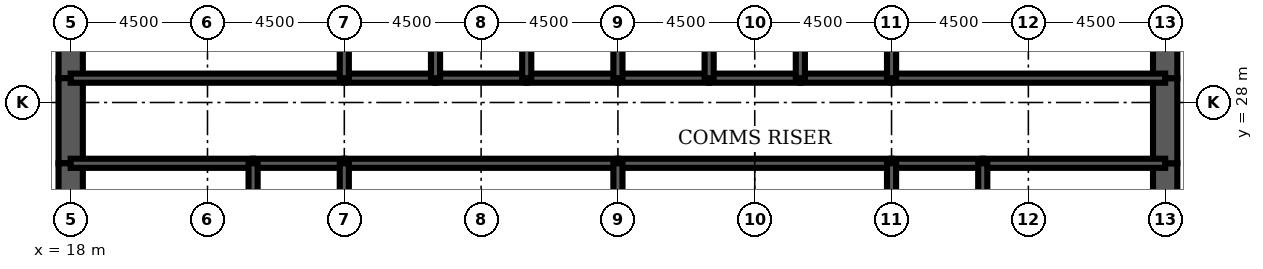
"""IFC4 building model, lengths in metres.
Left out: names, types, materials, properties, quantities, classifications, styles, units other than length and angle.
Written with IfcOpenShell. Run it as: python <this file> out.ifc"""

import sys

from ifc_helpers import new_model, si_unit, direction, frame, frame_2d, origin, place, context, subcontext, project, spatial, rectangle, extrude, element, fill, save


model = new_model("IFC4")
c1 = context("Model", 3, precision=1e-05, world=origin(), true_north=direction((0.0, 1.0)))
c2 = subcontext(c1, "Body", "Model", "MODEL_VIEW")
j1 = project(units=[si_unit("LENGTHUNIT", "METRE"), si_unit("PLANEANGLEUNIT", "RADIAN")], contexts=[c1])
p1 = place(None, origin())
s1 = spatial("IfcSite", under=j1, at=p1, CompositionType="ELEMENT")
p2 = place(p1, origin())
s2 = spatial("IfcBuilding", under=s1, at=p2, CompositionType="ELEMENT")
p3 = place(p2, frame((0.0, 0.0, 240.4)))
s3 = spatial("IfcBuildingStorey", under=s2, at=p3, CompositionType="ELEMENT", Elevation=240.4)
p4 = place(p3, frame((18.0, 32.0, 0.0), z_axis=(0.0, 0.0, 1.0), x_axis=(0.0, -1.0, 0.0)))
e1 = element("IfcWall", 1, at=p4, inside=s3, PredefinedType="SHEAR", context=c2, shape_type="SweptSolid", body=[
    extrude(rectangle(XDim=3.2, YDim=0.8, at=frame_2d((1.6, 0.0))), origin(), (0.0, 0.0, 1.0), 4.2),
])
p5 = place(p3, frame((18.0, 28.8, 0.0), z_axis=(0.0, 0.0, 1.0), x_axis=(0.0, -1.0, 0.0)))
e2 = element("IfcWall", 2, at=p5, inside=s3, PredefinedType="SHEAR", context=c2, shape_type="SweptSolid", body=[
    extrude(rectangle(XDim=2.8, YDim=0.8, at=frame_2d((1.4, 0.0))), origin(), (0.0, 0.0, 1.0), 4.2),
])
p6 = place(p5, frame((0.4, 0.0, 0.0)))
e3 = element("IfcOpeningElement", 3, at=p6, cuts=e2, PredefinedType="OPENING", context=c2, shape_type="SweptSolid", body=[
    extrude(rectangle(XDim=1.8, YDim=2.1, at=frame_2d((0.9, 1.05))), frame((0.0, 0.41, 0.0), z_axis=(0.0, -1.0, 0.0), x_axis=(1.0, 0.0, 0.0)), (0.0, 0.0, 1.0), 0.82),
])
for number, where, z_axis, x_axis in (
    (4, (18.0, 26.0, 0.0), (0.0, 0.0, 1.0), (0.0, -1.0, 0.0)),
    (5, (54.0, 22.0, 0.0), (0.0, 0.0, 1.0), (0.0, 1.0, 0.0)),
):
    element("IfcWall", number, at=place(p3, frame(where, z_axis=z_axis, x_axis=x_axis)), inside=s3, PredefinedType="SHEAR", context=c2, shape_type="SweptSolid", body=[
        extrude(rectangle(XDim=4.0, YDim=0.8, at=frame_2d((2.0, 0.0))), origin(), (0.0, 0.0, 1.0), 4.2),
    ])
p7 = place(p3, frame((54.0, 26.0, 0.0), z_axis=(0.0, 0.0, 1.0), x_axis=(0.0, 1.0, 0.0)))
e6 = element("IfcWall", 6, at=p7, inside=s3, PredefinedType="SHEAR", context=c2, shape_type="SweptSolid", body=[
    extrude(rectangle(XDim=2.8, YDim=0.8, at=frame_2d((1.4, 0.0))), origin(), (0.0, 0.0, 1.0), 4.2),
])
p8 = place(p7, frame((0.6, 0.0, 0.0)))
e7 = element("IfcOpeningElement", 7, at=p8, cuts=e6, PredefinedType="OPENING", context=c2, shape_type="SweptSolid", body=[
    extrude(rectangle(XDim=1.8, YDim=2.1, at=frame_2d((0.9, 1.05))), frame((0.0, 0.41, 0.0), z_axis=(0.0, -1.0, 0.0), x_axis=(1.0, 0.0, 0.0)), (0.0, 0.0, 1.0), 0.82),
])
p9 = place(p3, frame((54.0, 28.8, 0.0), z_axis=(0.0, 0.0, 1.0), x_axis=(0.0, 1.0, 0.0)))
e8 = element("IfcWall", 8, at=p9, inside=s3, PredefinedType="SHEAR", context=c2, shape_type="SweptSolid", body=[
    extrude(rectangle(XDim=3.2, YDim=0.8, at=frame_2d((1.6, 0.0))), origin(), (0.0, 0.0, 1.0), 4.2),
])
p10 = place(p3, frame((18.0, 28.8, 0.0), z_axis=(0.0, 0.0, 1.0), x_axis=(1.0, 0.0, 0.0)))
e9 = element("IfcWall", 9, at=p10, inside=s3, PredefinedType="SOLIDWALL", context=c2, shape_type="SweptSolid", body=[
    extrude(rectangle(XDim=9.0, YDim=0.3, at=frame_2d((4.5, 0.0))), origin(), (0.0, 0.0, 1.0), 4.2),
])
p11 = place(p10, frame((0.65, 0.0, 0.0)))
e10 = element("IfcOpeningElement", 10, at=p11, cuts=e9, PredefinedType="OPENING", context=c2, shape_type="SweptSolid", body=[
    extrude(rectangle(XDim=1.0, YDim=2.1, at=frame_2d((0.5, 1.05))), frame((0.0, 0.16, 0.0), z_axis=(0.0, -1.0, 0.0), x_axis=(1.0, 0.0, 0.0)), (0.0, 0.0, 1.0), 0.32),
])
p12 = place(p3, frame((27.0, 28.8, 0.0), z_axis=(0.0, 0.0, 1.0), x_axis=(1.0, 0.0, 0.0)))
e11 = element("IfcWall", 11, at=p12, inside=s3, PredefinedType="SOLIDWALL", context=c2, shape_type="SweptSolid", body=[
    extrude(rectangle(XDim=3.0, YDim=0.3, at=frame_2d((1.5, 0.0))), origin(), (0.0, 0.0, 1.0), 4.2),
])
p13 = place(p12, frame((0.95, 0.0, 0.0)))
e12 = element("IfcOpeningElement", 12, at=p13, cuts=e11, PredefinedType="OPENING", context=c2, shape_type="SweptSolid", body=[
    extrude(rectangle(XDim=1.1, YDim=2.2, at=frame_2d((0.55, 1.1))), frame((0.0, 0.16, 0.0), z_axis=(0.0, -1.0, 0.0), x_axis=(1.0, 0.0, 0.0)), (0.0, 0.0, 1.0), 0.32),
])
p14 = place(p3, frame((30.0, 28.8, 0.0), z_axis=(0.0, 0.0, 1.0), x_axis=(1.0, 0.0, 0.0)))
e13 = element("IfcWall", 13, at=p14, inside=s3, PredefinedType="SOLIDWALL", context=c2, shape_type="SweptSolid", body=[
    extrude(rectangle(XDim=3.0, YDim=0.3, at=frame_2d((1.5, 0.0))), origin(), (0.0, 0.0, 1.0), 4.2),
])
p15 = place(p14, frame((0.95, 0.0, 0.0)))
e14 = element("IfcOpeningElement", 14, at=p15, cuts=e13, PredefinedType="OPENING", context=c2, shape_type="SweptSolid", body=[
    extrude(rectangle(XDim=1.1, YDim=2.2, at=frame_2d((0.55, 1.1))), frame((0.0, 0.16, 0.0), z_axis=(0.0, -1.0, 0.0), x_axis=(1.0, 0.0, 0.0)), (0.0, 0.0, 1.0), 0.32),
])
p16 = place(p3, frame((33.0, 28.8, 0.0), z_axis=(0.0, 0.0, 1.0), x_axis=(1.0, 0.0, 0.0)))
e15 = element("IfcWall", 15, at=p16, inside=s3, PredefinedType="SOLIDWALL", context=c2, shape_type="SweptSolid", body=[
    extrude(rectangle(XDim=3.0, YDim=0.3, at=frame_2d((1.5, 0.0))), origin(), (0.0, 0.0, 1.0), 4.2),
])
p17 = place(p16, frame((0.95, 0.0, 0.0)))
e16 = element("IfcOpeningElement", 16, at=p17, cuts=e15, PredefinedType="OPENING", context=c2, shape_type="SweptSolid", body=[
    extrude(rectangle(XDim=1.1, YDim=2.2, at=frame_2d((0.55, 1.1))), frame((0.0, 0.16, 0.0), z_axis=(0.0, -1.0, 0.0), x_axis=(1.0, 0.0, 0.0)), (0.0, 0.0, 1.0), 0.32),
])
for number, where, z_axis, x_axis in (
    (17, (36.0, 28.8, 0.0), (0.0, 0.0, 1.0), (1.0, 0.0, 0.0)),
    (18, (39.0, 28.8, 0.0), (0.0, 0.0, 1.0), (1.0, 0.0, 0.0)),
):
    element("IfcWall", number, at=place(p3, frame(where, z_axis=z_axis, x_axis=x_axis)), inside=s3, PredefinedType="SOLIDWALL", context=c2, shape_type="SweptSolid", body=[
        extrude(rectangle(XDim=3.0, YDim=0.3, at=frame_2d((1.5, 0.0))), origin(), (0.0, 0.0, 1.0), 4.2),
    ])
p18 = place(p3, frame((42.0, 28.8, 0.0), z_axis=(0.0, 0.0, 1.0), x_axis=(1.0, 0.0, 0.0)))
e19 = element("IfcWall", 19, at=p18, inside=s3, PredefinedType="SOLIDWALL", context=c2, shape_type="SweptSolid", body=[
    extrude(rectangle(XDim=3.0, YDim=0.3, at=frame_2d((1.5, 0.0))), origin(), (0.0, 0.0, 1.0), 4.2),
])
p19 = place(p18, frame((0.95, 0.0, 0.0)))
e20 = element("IfcOpeningElement", 20, at=p19, cuts=e19, PredefinedType="OPENING", context=c2, shape_type="SweptSolid", body=[
    extrude(rectangle(XDim=1.1, YDim=2.2, at=frame_2d((0.55, 1.1))), frame((0.0, 0.16, 0.0), z_axis=(0.0, -1.0, 0.0), x_axis=(1.0, 0.0, 0.0)), (0.0, 0.0, 1.0), 0.32),
])
p20 = place(p3, frame((45.0, 28.8, 0.0), z_axis=(0.0, 0.0, 1.0), x_axis=(1.0, 0.0, 0.0)))
e21 = element("IfcWall", 21, at=p20, inside=s3, PredefinedType="SOLIDWALL", context=c2, shape_type="SweptSolid", body=[
    extrude(rectangle(XDim=9.0, YDim=0.3, at=frame_2d((4.5, 0.0))), origin(), (0.0, 0.0, 1.0), 4.2),
])
p21 = place(p20, frame((7.35, 0.0, 0.0)))
e22 = element("IfcOpeningElement", 22, at=p21, cuts=e21, PredefinedType="OPENING", context=c2, shape_type="SweptSolid", body=[
    extrude(rectangle(XDim=1.0, YDim=2.1, at=frame_2d((0.5, 1.05))), frame((0.0, 0.16, 0.0), z_axis=(0.0, -1.0, 0.0), x_axis=(1.0, 0.0, 0.0)), (0.0, 0.0, 1.0), 0.32),
])
p22 = place(p3, frame((18.0, 26.0, 0.0), z_axis=(0.0, 0.0, 1.0), x_axis=(1.0, 0.0, 0.0)))
e23 = element("IfcWall", 23, at=p22, inside=s3, PredefinedType="SOLIDWALL", context=c2, shape_type="SweptSolid", body=[
    extrude(rectangle(XDim=6.0, YDim=0.3, at=frame_2d((3.0, 0.0))), origin(), (0.0, 0.0, 1.0), 4.2),
])
p23 = place(p3, frame((24.0, 26.0, 0.0), z_axis=(0.0, 0.0, 1.0), x_axis=(1.0, 0.0, 0.0)))
e24 = element("IfcWall", 24, at=p23, inside=s3, PredefinedType="SOLIDWALL", context=c2, shape_type="SweptSolid", body=[
    extrude(rectangle(XDim=3.0, YDim=0.3, at=frame_2d((1.5, 0.0))), origin(), (0.0, 0.0, 1.0), 4.2),
])
for number, where, z_axis, x_axis in (
    (25, (27.0, 26.0, 0.0), (0.0, 0.0, 1.0), (1.0, 0.0, 0.0)),
    (26, (36.0, 26.0, 0.0), (0.0, 0.0, 1.0), (1.0, 0.0, 0.0)),
):
    element("IfcWall", number, at=place(p3, frame(where, z_axis=z_axis, x_axis=x_axis)), inside=s3, PredefinedType="SOLIDWALL", context=c2, shape_type="SweptSolid", body=[
        extrude(rectangle(XDim=9.0, YDim=0.3, at=frame_2d((4.5, 0.0))), origin(), (0.0, 0.0, 1.0), 4.2),
    ])
p24 = place(p3, frame((45.0, 26.0, 0.0), z_axis=(0.0, 0.0, 1.0), x_axis=(1.0, 0.0, 0.0)))
e27 = element("IfcWall", 27, at=p24, inside=s3, PredefinedType="SOLIDWALL", context=c2, shape_type="SweptSolid", body=[
    extrude(rectangle(XDim=3.0, YDim=0.3, at=frame_2d((1.5, 0.0))), origin(), (0.0, 0.0, 1.0), 4.2),
])
p25 = place(p3, frame((48.0, 26.0, 0.0), z_axis=(0.0, 0.0, 1.0), x_axis=(1.0, 0.0, 0.0)))
e28 = element("IfcWall", 28, at=p25, inside=s3, PredefinedType="SOLIDWALL", context=c2, shape_type="SweptSolid", body=[
    extrude(rectangle(XDim=6.0, YDim=0.3, at=frame_2d((3.0, 0.0))), origin(), (0.0, 0.0, 1.0), 4.2),
])
for number, where, z_axis, x_axis in (
    (29, (27.0, 28.8, 0.0), (0.0, 0.0, 1.0), (0.0, 1.0, 0.0)),
    (30, (30.0, 28.8, 0.0), (0.0, 0.0, 1.0), (0.0, 1.0, 0.0)),
    (31, (33.0, 28.8, 0.0), (0.0, 0.0, 1.0), (0.0, 1.0, 0.0)),
    (32, (36.0, 28.8, 0.0), (0.0, 0.0, 1.0), (0.0, 1.0, 0.0)),
    (33, (39.0, 28.8, 0.0), (0.0, 0.0, 1.0), (0.0, 1.0, 0.0)),
    (34, (42.0, 28.8, 0.0), (0.0, 0.0, 1.0), (0.0, 1.0, 0.0)),
    (35, (45.0, 28.8, 0.0), (0.0, 0.0, 1.0), (0.0, 1.0, 0.0)),
):
    element("IfcWall", number, at=place(p3, frame(where, z_axis=z_axis, x_axis=x_axis)), inside=s3, PredefinedType="SOLIDWALL", context=c2, shape_type="SweptSolid", body=[
        extrude(rectangle(XDim=3.2, YDim=0.3, at=frame_2d((1.6, 0.0))), origin(), (0.0, 0.0, 1.0), 4.2),
    ])
for number, where, z_axis, x_axis in (
    (36, (24.0, 22.0, 0.0), (0.0, 0.0, 1.0), (0.0, 1.0, 0.0)),
    (37, (27.0, 22.0, 0.0), (0.0, 0.0, 1.0), (0.0, 1.0, 0.0)),
    (38, (36.0, 22.0, 0.0), (0.0, 0.0, 1.0), (0.0, 1.0, 0.0)),
    (39, (45.0, 22.0, 0.0), (0.0, 0.0, 1.0), (0.0, 1.0, 0.0)),
    (40, (48.0, 22.0, 0.0), (0.0, 0.0, 1.0), (0.0, 1.0, 0.0)),
):
    element("IfcWall", number, at=place(p3, frame(where, z_axis=z_axis, x_axis=x_axis)), inside=s3, PredefinedType="SOLIDWALL", context=c2, shape_type="SweptSolid", body=[
        extrude(rectangle(XDim=4.0, YDim=0.3, at=frame_2d((2.0, 0.0))), origin(), (0.0, 0.0, 1.0), 4.2),
    ])
p26 = place(p3, frame((39.0, 22.15, 0.0), z_axis=(0.0, 0.0, 1.0), x_axis=(0.0, 1.0, 0.0)))
e41 = element("IfcWall", 41, at=p26, inside=s3, PredefinedType="PARTITIONING", context=c2, shape_type="SweptSolid", body=[
    extrude(rectangle(XDim=3.7, YDim=0.15, at=frame_2d((1.85, 0.0))), origin(), (0.0, 0.0, 1.0), 3.0),
])
p27 = place(p26, frame((2.2, 0.0, 0.0)))
e42 = element("IfcOpeningElement", 42, at=p27, cuts=e41, PredefinedType="OPENING", context=c2, shape_type="SweptSolid", body=[
    extrude(rectangle(XDim=1.0, YDim=2.1, at=frame_2d((0.5, 1.05))), frame((0.0, 0.085, 0.0), z_axis=(0.0, -1.0, 0.0), x_axis=(1.0, 0.0, 0.0)), (0.0, 0.0, 1.0), 0.17),
])
for number, where, z_axis, x_axis in (
    (43, (19.975, 22.15, 0.0), (0.0, 0.0, 1.0), (0.0, 1.0, 0.0)),
    (44, (51.425, 22.15, 0.0), (0.0, 0.0, 1.0), (0.0, 1.0, 0.0)),
):
    element("IfcWall", number, at=place(p3, frame(where, z_axis=z_axis, x_axis=x_axis)), inside=s3, PredefinedType="PARTITIONING", context=c2, shape_type="SweptSolid", body=[
        extrude(rectangle(XDim=3.7, YDim=0.15, at=frame_2d((1.85, 0.0))), origin(), (0.0, 0.0, 1.0), 3.0),
    ])
p28 = place(p27, origin())
e45 = element("IfcDoor", 45, at=p28, inside=s3, OperationType="SINGLE_SWING_RIGHT", PredefinedType="DOOR", context=c2, shape_type="SweptSolid", body=[
    extrude(rectangle(XDim=1.0, YDim=2.1, at=frame_2d((0.5, 1.05))), frame((0.0, 0.025, 0.0), z_axis=(0.0, -1.0, 0.0), x_axis=(1.0, 0.0, 0.0)), (0.0, 0.0, 1.0), 0.05),
])
fill(e42, e45)
p29 = place(p19, origin())
e46 = element("IfcDoor", 46, at=p29, inside=s3, OperationType="DOUBLE_DOOR_SLIDING", PredefinedType="USERDEFINED", context=c2, shape_type="SweptSolid", body=[
    extrude(rectangle(XDim=1.1, YDim=2.2, at=frame_2d((0.55, 1.1))), frame((0.0, 0.025, 0.0), z_axis=(0.0, -1.0, 0.0), x_axis=(1.0, 0.0, 0.0)), (0.0, 0.0, 1.0), 0.05),
])
fill(e20, e46)
p30 = place(p13, origin())
e47 = element("IfcDoor", 47, at=p30, inside=s3, OperationType="DOUBLE_DOOR_SLIDING", PredefinedType="USERDEFINED", context=c2, shape_type="SweptSolid", body=[
    extrude(rectangle(XDim=1.1, YDim=2.2, at=frame_2d((0.55, 1.1))), frame((0.0, 0.025, 0.0), z_axis=(0.0, -1.0, 0.0), x_axis=(1.0, 0.0, 0.0)), (0.0, 0.0, 1.0), 0.05),
])
fill(e12, e47)
p31 = place(p15, origin())
e48 = element("IfcDoor", 48, at=p31, inside=s3, OperationType="DOUBLE_DOOR_SLIDING", PredefinedType="USERDEFINED", context=c2, shape_type="SweptSolid", body=[
    extrude(rectangle(XDim=1.1, YDim=2.2, at=frame_2d((0.55, 1.1))), frame((0.0, 0.025, 0.0), z_axis=(0.0, -1.0, 0.0), x_axis=(1.0, 0.0, 0.0)), (0.0, 0.0, 1.0), 0.05),
])
fill(e14, e48)
p32 = place(p17, origin())
e49 = element("IfcDoor", 49, at=p32, inside=s3, OperationType="DOUBLE_DOOR_SLIDING", PredefinedType="USERDEFINED", context=c2, shape_type="SweptSolid", body=[
    extrude(rectangle(XDim=1.1, YDim=2.2, at=frame_2d((0.55, 1.1))), frame((0.0, 0.025, 0.0), z_axis=(0.0, -1.0, 0.0), x_axis=(1.0, 0.0, 0.0)), (0.0, 0.0, 1.0), 0.05),
])
fill(e16, e49)
p33 = place(p11, origin())
e50 = element("IfcDoor", 50, at=p33, inside=s3, OperationType="SINGLE_SWING_LEFT", PredefinedType="DOOR", context=c2, shape_type="SweptSolid", body=[
    extrude(rectangle(XDim=1.0, YDim=2.1, at=frame_2d((0.5, 1.05))), frame((0.0, 0.025, 0.0), z_axis=(0.0, -1.0, 0.0), x_axis=(1.0, 0.0, 0.0)), (0.0, 0.0, 1.0), 0.05),
])
fill(e10, e50)
p34 = place(p21, origin())
e51 = element("IfcDoor", 51, at=p34, inside=s3, OperationType="SINGLE_SWING_RIGHT", PredefinedType="DOOR", context=c2, shape_type="SweptSolid", body=[
    extrude(rectangle(XDim=1.0, YDim=2.1, at=frame_2d((0.5, 1.05))), frame((0.0, 0.025, 0.0), z_axis=(0.0, -1.0, 0.0), x_axis=(1.0, 0.0, 0.0)), (0.0, 0.0, 1.0), 0.05),
])
fill(e22, e51)
p35 = place(p6, origin())
e52 = element("IfcDoor", 52, at=p35, inside=s3, OperationType="SINGLE_SWING_LEFT", PredefinedType="DOOR", context=c2, shape_type="SweptSolid", body=[
    extrude(rectangle(XDim=1.8, YDim=2.1, at=frame_2d((0.9, 1.05))), frame((0.0, 0.4, 0.0), z_axis=(0.0, -1.0, 0.0), x_axis=(1.0, 0.0, 0.0)), (0.0, 0.0, 1.0), 0.8),
])
fill(e3, e52)
p36 = place(p8, origin())
e53 = element("IfcDoor", 53, at=p36, inside=s3, OperationType="SINGLE_SWING_LEFT", PredefinedType="DOOR", context=c2, shape_type="SweptSolid", body=[
    extrude(rectangle(XDim=1.8, YDim=2.1, at=frame_2d((0.9, 1.05))), frame((0.0, 0.4, 0.0), z_axis=(0.0, -1.0, 0.0), x_axis=(1.0, 0.0, 0.0)), (0.0, 0.0, 1.0), 0.8),
])
fill(e7, e53)
save(model, sys.argv[1])
